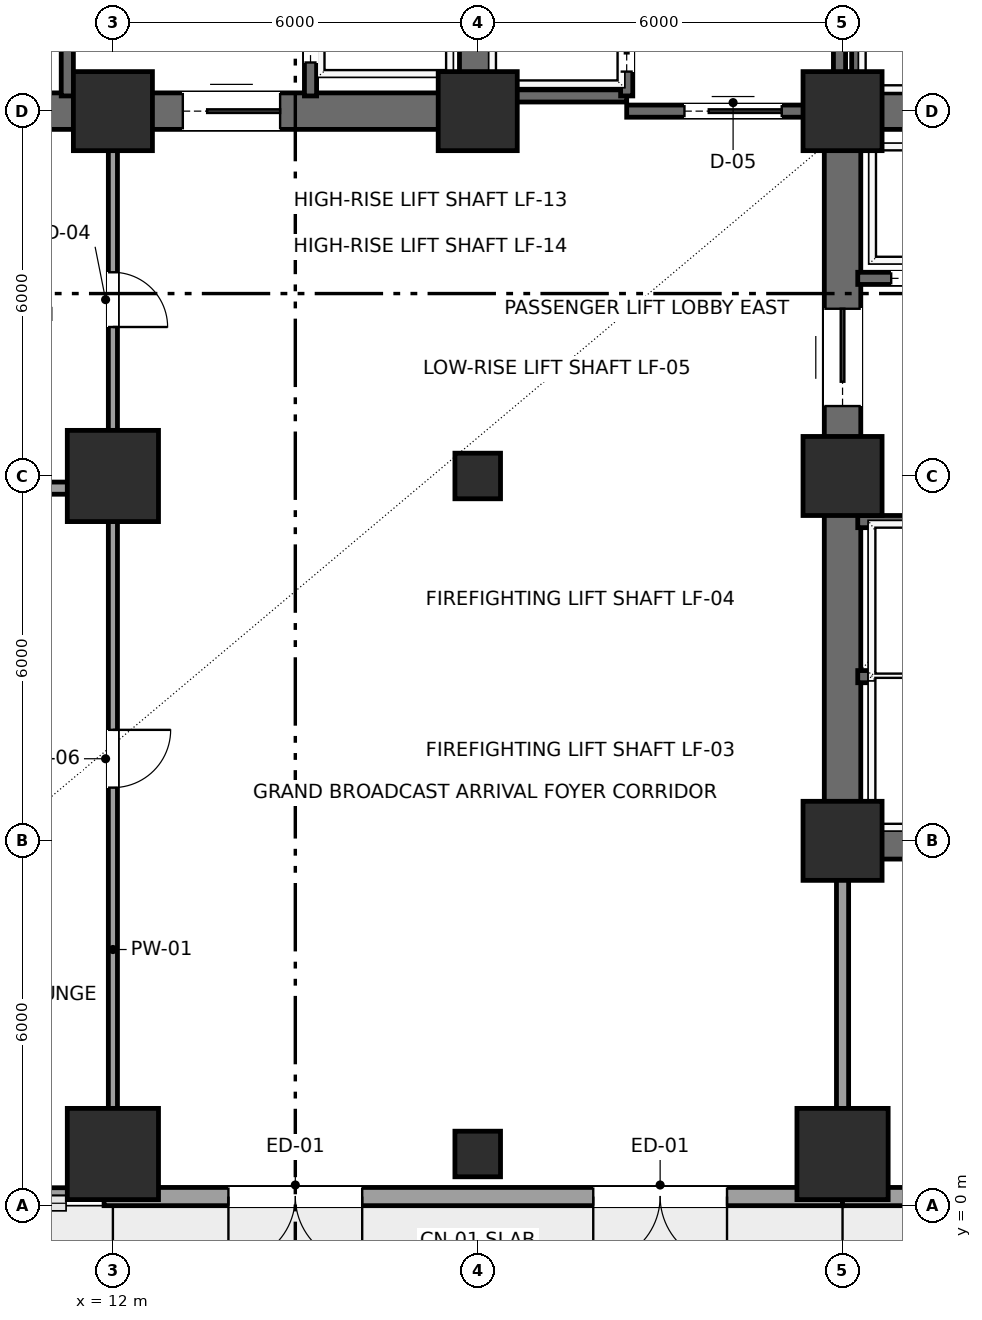
"""IFC4 building model, lengths in metres.
Left out: names, types, materials, properties, quantities, classifications, styles, units other than length and angle.
Written with IfcOpenShell. Run it as: python <this file> out.ifc"""

import sys

from ifc_helpers import new_model, si_unit, direction, frame, frame_2d, origin, origin_2d, place, context, subcontext, project, spatial, rectangle, hollow_rectangle, extrude, element, fill, save


model = new_model("IFC4")
c1 = context("Model", 3, precision=1e-05, world=origin(), true_north=direction((0.0, 1.0)))
c2 = subcontext(c1, "Body", "Model", "MODEL_VIEW")
j1 = project(units=[si_unit("LENGTHUNIT", "METRE"), si_unit("PLANEANGLEUNIT", "RADIAN")], contexts=[c1])
p1 = place(None, origin())
s1 = spatial("IfcSite", under=j1, at=p1, CompositionType="ELEMENT")
p2 = place(p1, origin())
s2 = spatial("IfcBuilding", under=s1, at=p2, CompositionType="ELEMENT")
p3 = place(p2, origin())
s3 = spatial("IfcBuildingStorey", under=s2, at=p3, CompositionType="ELEMENT", Elevation=0.0)
for number, where, z_axis, x_axis in (
    (1, (12.0, 18.0, 0.0), (0.0, 0.0, 1.0), (1.0, 0.0, 0.0)),
    (2, (18.0, 18.0, 0.0), (0.0, 0.0, 1.0), (1.0, 0.0, 0.0)),
    (3, (24.0, 6.0, 0.0), (0.0, 0.0, 1.0), (1.0, 0.0, 0.0)),
    (4, (24.0, 12.0, 0.0), (0.0, 0.0, 1.0), (1.0, 0.0, 0.0)),
    (5, (24.0, 18.0, 0.0), (0.0, 0.0, 1.0), (1.0, 0.0, 0.0)),
):
    element("IfcColumn", number, at=place(p3, frame(where, z_axis=z_axis, x_axis=x_axis)), inside=s3, PredefinedType="COLUMN", context=c2, shape_type="SweptSolid", body=[
        extrude(rectangle(XDim=1.3, YDim=1.3, at=origin_2d()), origin(), (0.0, 0.0, 1.0), 5.7),
    ])
for number, where, z_axis, x_axis in (
    (6, (12.0, 0.85, 0.0), (0.0, 0.0, 1.0), (1.0, 0.0, 0.0)),
    (7, (12.0, 12.0, 0.0), (0.0, 0.0, 1.0), (1.0, 0.0, 0.0)),
):
    element("IfcColumn", number, at=place(p3, frame(where, z_axis=z_axis, x_axis=x_axis)), inside=s3, PredefinedType="COLUMN", context=c2, shape_type="SweptSolid", body=[
        extrude(rectangle(XDim=1.5, YDim=1.5, at=origin_2d()), origin(), (0.0, 0.0, 1.0), 5.7),
    ])
for number, where, z_axis, x_axis in (
    (8, (18.0, 0.85, 0.0), (0.0, 0.0, 1.0), (1.0, 0.0, 0.0)),
    (9, (18.0, 12.0, 0.0), (0.0, 0.0, 1.0), (1.0, 0.0, 0.0)),
):
    element("IfcColumn", number, at=place(p3, frame(where, z_axis=z_axis, x_axis=x_axis)), inside=s3, PredefinedType="COLUMN", context=c2, shape_type="SweptSolid", body=[
        extrude(hollow_rectangle(XDim=0.75, YDim=0.75, WallThickness=0.035, InnerFilletRadius=0.035, OuterFilletRadius=0.05, at=origin_2d()), origin(), (0.0, 0.0, 1.0), 5.7),
    ])
p4 = place(p3, frame((24.0, 0.85, 0.0), z_axis=(0.0, 0.0, 1.0), x_axis=(1.0, 0.0, 0.0)))
e10 = element("IfcColumn", 10, at=p4, inside=s3, PredefinedType="COLUMN", context=c2, shape_type="SweptSolid", body=[
    extrude(rectangle(XDim=1.5, YDim=1.5, at=origin_2d()), origin(), (0.0, 0.0, 1.0), 5.7),
])
p5 = place(p3, frame((24.0, 0.15, 0.0), z_axis=(0.0, 0.0, 1.0), x_axis=(-1.0, 0.0, 0.0)))
e11 = element("IfcWall", 11, at=p5, inside=s3, PredefinedType="SOLIDWALL", context=c2, shape_type="SweptSolid", body=[
    extrude(rectangle(XDim=12.145, YDim=0.3, at=frame_2d((6.073, 0.0))), origin(), (0.0, 0.0, 1.0), 5.4),
])
p6 = place(p5, frame((1.9, 0.0, 0.0)))
e12 = element("IfcOpeningElement", 12, at=p6, cuts=e11, PredefinedType="OPENING", context=c2, shape_type="SweptSolid", body=[
    extrude(rectangle(XDim=2.2, YDim=2.6, at=frame_2d((1.1, 1.3))), frame((0.0, 0.16, 0.0), z_axis=(0.0, -1.0, 0.0), x_axis=(1.0, 0.0, 0.0)), (0.0, 0.0, 1.0), 0.32),
])
p7 = place(p5, frame((7.9, 0.0, 0.0)))
e13 = element("IfcOpeningElement", 13, at=p7, cuts=e11, PredefinedType="OPENING", context=c2, shape_type="SweptSolid", body=[
    extrude(rectangle(XDim=2.2, YDim=2.6, at=frame_2d((1.1, 1.3))), frame((0.0, 0.16, 0.0), z_axis=(0.0, -1.0, 0.0), x_axis=(1.0, 0.0, 0.0)), (0.0, 0.0, 1.0), 0.32),
])
p8 = place(p3, frame((53.295, 0.15, 0.0), z_axis=(0.0, 0.0, 1.0), x_axis=(-1.0, 0.0, 0.0)))
e14 = element("IfcWall", 14, at=p8, inside=s3, PredefinedType="SOLIDWALL", context=c2, shape_type="SweptSolid", body=[
    extrude(rectangle(XDim=29.295, YDim=0.3, at=frame_2d((14.647, 0.0))), origin(), (0.0, 0.0, 1.0), 5.4),
])
p9 = place(p8, frame((2.95, 0.0, 0.0)))
e15 = element("IfcOpeningElement", 15, at=p9, cuts=e14, PredefinedType="OPENING", context=c2, shape_type="SweptSolid", body=[
    extrude(rectangle(XDim=2.2, YDim=2.6, at=frame_2d((1.1, 1.3))), frame((0.0, 0.16, 0.0), z_axis=(0.0, -1.0, 0.0), x_axis=(1.0, 0.0, 0.0)), (0.0, 0.0, 1.0), 0.32),
])
p10 = place(p8, frame((9.0, 0.0, 0.0)))
e16 = element("IfcOpeningElement", 16, at=p10, cuts=e14, PredefinedType="OPENING", context=c2, shape_type="SweptSolid", body=[
    extrude(rectangle(XDim=2.2, YDim=2.6, at=frame_2d((1.1, 1.3))), frame((0.0, 0.16, 0.0), z_axis=(0.0, -1.0, 0.0), x_axis=(1.0, 0.0, 0.0)), (0.0, 0.0, 1.0), 0.32),
])
p11 = place(p8, frame((14.8, 0.0, 0.0)))
e17 = element("IfcOpeningElement", 17, at=p11, cuts=e14, PredefinedType="OPENING", context=c2, shape_type="SweptSolid", body=[
    extrude(rectangle(XDim=2.2, YDim=2.6, at=frame_2d((1.1, 1.3))), frame((0.0, 0.16, 0.0), z_axis=(0.0, -1.0, 0.0), x_axis=(1.0, 0.0, 0.0)), (0.0, 0.0, 1.0), 0.32),
])
p12 = place(p8, frame((25.6, 0.0, 0.0)))
e18 = element("IfcOpeningElement", 18, at=p12, cuts=e14, PredefinedType="OPENING", context=c2, shape_type="SweptSolid", body=[
    extrude(rectangle(XDim=1.1, YDim=2.2, at=frame_2d((0.55, 1.1))), frame((0.0, 0.16, 0.0), z_axis=(0.0, -1.0, 0.0), x_axis=(1.0, 0.0, 0.0)), (0.0, 0.0, 1.0), 0.32),
])
p13 = place(p3, frame((6.0, 18.0, 0.0), z_axis=(0.0, 0.0, 1.0), x_axis=(1.0, 0.0, 0.0)))
e19 = element("IfcWall", 19, at=p13, inside=s3, PredefinedType="SHEAR", context=c2, shape_type="SweptSolid", body=[
    extrude(rectangle(XDim=12.0, YDim=0.6, at=frame_2d((6.0, 0.0))), origin(), (0.0, 0.0, 1.0), 5.4),
])
p14 = place(p13, frame((7.15, 0.0, 0.0)))
e20 = element("IfcOpeningElement", 20, at=p14, cuts=e19, PredefinedType="OPENING", context=c2, shape_type="SweptSolid", body=[
    extrude(rectangle(XDim=1.6, YDim=2.3, at=frame_2d((0.8, 1.15))), frame((0.0, 0.31, 0.0), z_axis=(0.0, -1.0, 0.0), x_axis=(1.0, 0.0, 0.0)), (0.0, 0.0, 1.0), 0.62),
])
p15 = place(p3, frame((18.0, 18.0, 0.0), z_axis=(0.0, 0.0, 1.0), x_axis=(0.0, 1.0, 0.0)))
e21 = element("IfcWall", 21, at=p15, inside=s3, PredefinedType="SHEAR", context=c2, shape_type="SweptSolid", body=[
    extrude(rectangle(XDim=9.6, YDim=0.6, at=frame_2d((4.8, 0.0))), origin(), (0.0, 0.0, 1.0), 5.4),
])
p16 = place(p3, frame((24.0, 6.0, 0.0), z_axis=(0.0, 0.0, 1.0), x_axis=(1.0, 0.0, 0.0)))
e22 = element("IfcWall", 22, at=p16, inside=s3, PredefinedType="SHEAR", context=c2, shape_type="SweptSolid", body=[
    extrude(rectangle(XDim=9.6, YDim=0.6, at=frame_2d((4.8, 0.0))), origin(), (0.0, 0.0, 1.0), 5.4),
])
p17 = place(p16, frame((6.45, 0.0, 0.0)))
e23 = element("IfcOpeningElement", 23, at=p17, cuts=e22, PredefinedType="OPENING", context=c2, shape_type="SweptSolid", body=[
    extrude(rectangle(XDim=1.1, YDim=2.2, at=frame_2d((0.55, 1.1))), frame((0.0, 0.31, 0.0), z_axis=(0.0, -1.0, 0.0), x_axis=(1.0, 0.0, 0.0)), (0.0, 0.0, 1.0), 0.62),
])
p18 = place(p3, frame((24.0, 18.0, 0.0), z_axis=(0.0, 0.0, 1.0), x_axis=(1.0, 0.0, 0.0)))
e24 = element("IfcWall", 24, at=p18, inside=s3, PredefinedType="SHEAR", context=c2, shape_type="SweptSolid", body=[
    extrude(rectangle(XDim=9.6, YDim=0.6, at=frame_2d((4.8, 0.0))), origin(), (0.0, 0.0, 1.0), 5.4),
])
p19 = place(p3, frame((24.0, 6.0, 0.0), z_axis=(0.0, 0.0, 1.0), x_axis=(0.0, 1.0, 0.0)))
e25 = element("IfcWall", 25, at=p19, inside=s3, PredefinedType="SHEAR", context=c2, shape_type="SweptSolid", body=[
    extrude(rectangle(XDim=12.0, YDim=0.6, at=frame_2d((6.0, 0.0))), origin(), (0.0, 0.0, 1.0), 5.4),
])
p20 = place(p19, frame((7.15, 0.0, 0.0)))
e26 = element("IfcOpeningElement", 26, at=p20, cuts=e25, PredefinedType="OPENING", context=c2, shape_type="SweptSolid", body=[
    extrude(rectangle(XDim=1.6, YDim=2.3, at=frame_2d((0.8, 1.15))), frame((0.0, 0.31, 0.0), z_axis=(0.0, -1.0, 0.0), x_axis=(1.0, 0.0, 0.0)), (0.0, 0.0, 1.0), 0.62),
])
for number, where, z_axis, x_axis in (
    (27, (11.25, 18.25, 0.0), (0.0, 0.0, 1.0), (0.0, 1.0, 0.0)),
    (28, (24.25, 8.7, 0.0), (0.0, 0.0, 1.0), (1.0, 0.0, 0.0)),
    (29, (24.25, 11.25, 0.0), (0.0, 0.0, 1.0), (1.0, 0.0, 0.0)),
):
    element("IfcWall", number, at=place(p3, frame(where, z_axis=z_axis, x_axis=x_axis)), inside=s3, PredefinedType="SHEAR", context=c2, shape_type="SweptSolid", body=[
        extrude(rectangle(XDim=2.17, YDim=0.2, at=frame_2d((1.085, 0.0))), origin(), (0.0, 0.0, 1.0), 5.4),
    ])
p21 = place(p3, frame((15.25, 18.25, 0.0), z_axis=(0.0, 0.0, 1.0), x_axis=(0.0, 1.0, 0.0)))
e30 = element("IfcWall", 30, at=p21, inside=s3, PredefinedType="SHEAR", context=c2, shape_type="SweptSolid", body=[
    extrude(rectangle(XDim=5.2, YDim=0.2, at=frame_2d((2.6, 0.0))), origin(), (0.0, 0.0, 1.0), 5.4),
])
p22 = place(p21, frame((0.55, 0.0, 0.0)))
e31 = element("IfcOpeningElement", 31, at=p22, cuts=e30, PredefinedType="OPENING", context=c2, shape_type="SweptSolid", body=[
    extrude(rectangle(XDim=1.2, YDim=2.2, at=frame_2d((0.6, 1.1))), frame((0.0, 0.11, 0.0), z_axis=(0.0, -1.0, 0.0), x_axis=(1.0, 0.0, 0.0)), (0.0, 0.0, 1.0), 0.22),
])
p23 = place(p21, frame((3.15, 0.0, 0.0)))
e32 = element("IfcOpeningElement", 32, at=p23, cuts=e30, PredefinedType="OPENING", context=c2, shape_type="SweptSolid", body=[
    extrude(rectangle(XDim=1.2, YDim=2.2, at=frame_2d((0.6, 1.1))), frame((0.0, 0.11, 0.0), z_axis=(0.0, -1.0, 0.0), x_axis=(1.0, 0.0, 0.0)), (0.0, 0.0, 1.0), 0.22),
])
p24 = place(p3, frame((24.25, 15.25, 0.0), z_axis=(0.0, 0.0, 1.0), x_axis=(1.0, 0.0, 0.0)))
e33 = element("IfcWall", 33, at=p24, inside=s3, PredefinedType="SHEAR", context=c2, shape_type="SweptSolid", body=[
    extrude(rectangle(XDim=5.2, YDim=0.2, at=frame_2d((2.6, 0.0))), origin(), (0.0, 0.0, 1.0), 5.4),
])
p25 = place(p24, frame((0.55, 0.0, 0.0)))
e34 = element("IfcOpeningElement", 34, at=p25, cuts=e33, PredefinedType="OPENING", context=c2, shape_type="SweptSolid", body=[
    extrude(rectangle(XDim=1.2, YDim=2.2, at=frame_2d((0.6, 1.1))), frame((0.0, 0.11, 0.0), z_axis=(0.0, -1.0, 0.0), x_axis=(1.0, 0.0, 0.0)), (0.0, 0.0, 1.0), 0.22),
])
p26 = place(p24, frame((3.15, 0.0, 0.0)))
e35 = element("IfcOpeningElement", 35, at=p26, cuts=e33, PredefinedType="OPENING", context=c2, shape_type="SweptSolid", body=[
    extrude(rectangle(XDim=1.2, YDim=2.2, at=frame_2d((0.6, 1.1))), frame((0.0, 0.11, 0.0), z_axis=(0.0, -1.0, 0.0), x_axis=(1.0, 0.0, 0.0)), (0.0, 0.0, 1.0), 0.22),
])
p27 = place(p3, frame((18.1, 18.25, 0.0), z_axis=(0.0, 0.0, 1.0), x_axis=(1.0, 0.0, 0.0)))
e36 = element("IfcWall", 36, at=p27, inside=s3, PredefinedType="SHEAR", context=c2, shape_type="SweptSolid", body=[
    extrude(rectangle(XDim=2.35, YDim=0.2, at=frame_2d((1.175, 0.0))), origin(), (0.0, 0.0, 1.0), 5.4),
])
p28 = place(p3, frame((20.45, 18.25, 0.0), z_axis=(0.0, 0.0, 1.0), x_axis=(0.0, 1.0, 0.0)))
e37 = element("IfcWall", 37, at=p28, inside=s3, PredefinedType="SHEAR", context=c2, shape_type="SweptSolid", body=[
    extrude(rectangle(XDim=9.05, YDim=0.2, at=frame_2d((4.525, 0.0))), origin(), (0.0, 0.0, 1.0), 5.4),
])
p29 = place(p28, frame((0.4, 0.0, 0.0)))
e38 = element("IfcOpeningElement", 38, at=p29, cuts=e37, PredefinedType="OPENING", context=c2, shape_type="SweptSolid", body=[
    extrude(rectangle(XDim=1.2, YDim=2.2, at=frame_2d((0.6, 1.1))), frame((0.0, 0.11, 0.0), z_axis=(0.0, -1.0, 0.0), x_axis=(1.0, 0.0, 0.0)), (0.0, 0.0, 1.0), 0.22),
])
p30 = place(p28, frame((2.65, 0.0, 0.0)))
e39 = element("IfcOpeningElement", 39, at=p30, cuts=e37, PredefinedType="OPENING", context=c2, shape_type="SweptSolid", body=[
    extrude(rectangle(XDim=1.2, YDim=2.2, at=frame_2d((0.6, 1.1))), frame((0.0, 0.11, 0.0), z_axis=(0.0, -1.0, 0.0), x_axis=(1.0, 0.0, 0.0)), (0.0, 0.0, 1.0), 0.22),
])
p31 = place(p28, frame((4.9, 0.0, 0.0)))
e40 = element("IfcOpeningElement", 40, at=p31, cuts=e37, PredefinedType="OPENING", context=c2, shape_type="SweptSolid", body=[
    extrude(rectangle(XDim=1.2, YDim=2.2, at=frame_2d((0.6, 1.1))), frame((0.0, 0.11, 0.0), z_axis=(0.0, -1.0, 0.0), x_axis=(1.0, 0.0, 0.0)), (0.0, 0.0, 1.0), 0.22),
])
p32 = place(p28, frame((7.15, 0.0, 0.0)))
e41 = element("IfcOpeningElement", 41, at=p32, cuts=e37, PredefinedType="OPENING", context=c2, shape_type="SweptSolid", body=[
    extrude(rectangle(XDim=1.2, YDim=2.2, at=frame_2d((0.6, 1.1))), frame((0.0, 0.11, 0.0), z_axis=(0.0, -1.0, 0.0), x_axis=(1.0, 0.0, 0.0)), (0.0, 0.0, 1.0), 0.22),
])
p33 = place(p3, frame((20.45, 18.0, 0.0), z_axis=(0.0, 0.0, 1.0), x_axis=(1.0, 0.0, 0.0)))
e42 = element("IfcWall", 42, at=p33, inside=s3, PredefinedType="SHEAR", context=c2, shape_type="SweptSolid", body=[
    extrude(rectangle(XDim=3.5, YDim=0.2, at=frame_2d((1.75, 0.0))), origin(), (0.0, 0.0, 1.0), 5.4),
])
p34 = place(p33, frame((0.95, 0.0, 0.0)))
e43 = element("IfcOpeningElement", 43, at=p34, cuts=e42, PredefinedType="OPENING", context=c2, shape_type="SweptSolid", body=[
    extrude(rectangle(XDim=1.6, YDim=2.3, at=frame_2d((0.8, 1.15))), frame((0.0, 0.11, 0.0), z_axis=(0.0, -1.0, 0.0), x_axis=(1.0, 0.0, 0.0)), (0.0, 0.0, 1.0), 0.22),
])
p35 = place(p3, frame((23.95, 18.0, 0.0), z_axis=(0.0, 0.0, 1.0), x_axis=(0.0, 1.0, 0.0)))
e44 = element("IfcWall", 44, at=p35, inside=s3, PredefinedType="SHEAR", context=c2, shape_type="SweptSolid", body=[
    extrude(rectangle(XDim=9.3, YDim=0.2, at=frame_2d((4.65, 0.0))), origin(), (0.0, 0.0, 1.0), 5.4),
])
p36 = place(p3, frame((24.25, 18.1, 0.0), z_axis=(0.0, 0.0, 1.0), x_axis=(0.0, 1.0, 0.0)))
e45 = element("IfcWall", 45, at=p36, inside=s3, PredefinedType="SHEAR", context=c2, shape_type="SweptSolid", body=[
    extrude(rectangle(XDim=2.35, YDim=0.2, at=frame_2d((1.175, 0.0))), origin(), (0.0, 0.0, 1.0), 5.4),
])
p37 = place(p3, frame((24.0, 0.22, 0.0), z_axis=(0.0, 0.0, 1.0), x_axis=(0.0, 1.0, 0.0)))
e46 = element("IfcWall", 46, at=p37, inside=s3, PredefinedType="SOLIDWALL", context=c2, shape_type="SweptSolid", body=[
    extrude(rectangle(XDim=5.78, YDim=0.2, at=frame_2d((2.89, 0.0))), origin(), (0.0, 0.0, 1.0), 3.492),
])
p38 = place(p3, frame((12.0, 17.96, 0.0), z_axis=(0.0, 0.0, 1.0), x_axis=(0.0, -1.0, 0.0)))
e47 = element("IfcWall", 47, at=p38, inside=s3, PredefinedType="PARTITIONING", context=c2, shape_type="SweptSolid", body=[
    extrude(rectangle(XDim=17.74, YDim=0.15, at=frame_2d((8.87, 0.0))), origin(), (0.0, 0.0, 1.0), 3.492),
])
p39 = place(p38, frame((2.61, 0.0, 0.0)))
e48 = element("IfcOpeningElement", 48, at=p39, cuts=e47, PredefinedType="OPENING", context=c2, shape_type="SweptSolid", body=[
    extrude(rectangle(XDim=0.9, YDim=2.15, at=frame_2d((0.45, 1.075))), frame((0.0, 0.085, 0.0), z_axis=(0.0, -1.0, 0.0), x_axis=(1.0, 0.0, 0.0)), (0.0, 0.0, 1.0), 0.17),
])
p40 = place(p38, frame((10.135, 0.0, 0.0)))
e49 = element("IfcOpeningElement", 49, at=p40, cuts=e47, PredefinedType="OPENING", context=c2, shape_type="SweptSolid", body=[
    extrude(rectangle(XDim=0.95, YDim=2.15, at=frame_2d((0.475, 1.075))), frame((0.0, 0.085, 0.0), z_axis=(0.0, -1.0, 0.0), x_axis=(1.0, 0.0, 0.0)), (0.0, 0.0, 1.0), 0.17),
])
p41 = place(p3, frame((0.22, 11.8, 0.0), z_axis=(0.0, 0.0, 1.0), x_axis=(1.0, 0.0, 0.0)))
e50 = element("IfcWall", 50, at=p41, inside=s3, PredefinedType="SOLIDWALL", context=c2, shape_type="SweptSolid", body=[
    extrude(rectangle(XDim=11.78, YDim=0.2, at=frame_2d((5.89, 0.0))), origin(), (0.0, 0.0, 1.0), 4.742),
])
p42 = place(p3, frame((0.22, 0.22, 0.0), z_axis=(0.0, 0.0, 1.0), x_axis=(1.0, 0.0, 0.0)))
e51 = element("IfcWall", 51, at=p42, inside=s3, PredefinedType="PARTITIONING", context=c2, shape_type="SweptSolid", body=[
    extrude(rectangle(XDim=11.635, YDim=0.15, at=frame_2d((5.817, 0.0))), origin(), (0.0, 0.0, 1.0), 5.4),
])
p43 = place(p6, origin())
e52 = element("IfcDoor", 52, at=p43, inside=s3, OperationType="DOUBLE_DOOR_SINGLE_SWING", PredefinedType="DOOR", context=c2, shape_type="SweptSolid", body=[
    extrude(rectangle(XDim=2.2, YDim=2.6, at=frame_2d((1.1, 1.3))), frame((0.0, 0.025, 0.0), z_axis=(0.0, -1.0, 0.0), x_axis=(1.0, 0.0, 0.0)), (0.0, 0.0, 1.0), 0.05),
])
fill(e12, e52)
p44 = place(p7, origin())
e53 = element("IfcDoor", 53, at=p44, inside=s3, OperationType="DOUBLE_DOOR_SINGLE_SWING", PredefinedType="DOOR", context=c2, shape_type="SweptSolid", body=[
    extrude(rectangle(XDim=2.2, YDim=2.6, at=frame_2d((1.1, 1.3))), frame((0.0, 0.025, 0.0), z_axis=(0.0, -1.0, 0.0), x_axis=(1.0, 0.0, 0.0)), (0.0, 0.0, 1.0), 0.05),
])
fill(e13, e53)
p45 = place(p14, origin())
e54 = element("IfcDoor", 54, at=p45, inside=s3, OperationType="DOUBLE_DOOR_SLIDING", PredefinedType="DOOR", context=c2, shape_type="SweptSolid", body=[
    extrude(rectangle(XDim=1.6, YDim=2.3, at=frame_2d((0.8, 1.15))), frame((0.0, 0.025, 0.0), z_axis=(0.0, -1.0, 0.0), x_axis=(1.0, 0.0, 0.0)), (0.0, 0.0, 1.0), 0.05),
])
fill(e20, e54)
p46 = place(p20, origin())
e55 = element("IfcDoor", 55, at=p46, inside=s3, OperationType="DOUBLE_DOOR_SLIDING", PredefinedType="DOOR", context=c2, shape_type="SweptSolid", body=[
    extrude(rectangle(XDim=1.6, YDim=2.3, at=frame_2d((0.8, 1.15))), frame((0.0, 0.025, 0.0), z_axis=(0.0, -1.0, 0.0), x_axis=(1.0, 0.0, 0.0)), (0.0, 0.0, 1.0), 0.05),
])
fill(e26, e55)
p47 = place(p22, origin())
e56 = element("IfcDoor", 56, at=p47, inside=s3, OperationType="SLIDING_TO_RIGHT", PredefinedType="DOOR", context=c2, shape_type="SweptSolid", body=[
    extrude(rectangle(XDim=1.2, YDim=2.2, at=frame_2d((0.6, 1.1))), frame((0.0, 0.025, 0.0), z_axis=(0.0, -1.0, 0.0), x_axis=(1.0, 0.0, 0.0)), (0.0, 0.0, 1.0), 0.05),
])
fill(e31, e56)
p48 = place(p25, origin())
e57 = element("IfcDoor", 57, at=p48, inside=s3, OperationType="SLIDING_TO_RIGHT", PredefinedType="DOOR", context=c2, shape_type="SweptSolid", body=[
    extrude(rectangle(XDim=1.2, YDim=2.2, at=frame_2d((0.6, 1.1))), frame((0.0, 0.025, 0.0), z_axis=(0.0, -1.0, 0.0), x_axis=(1.0, 0.0, 0.0)), (0.0, 0.0, 1.0), 0.05),
])
fill(e34, e57)
p49 = place(p29, origin())
e58 = element("IfcDoor", 58, at=p49, inside=s3, OperationType="SLIDING_TO_RIGHT", PredefinedType="DOOR", context=c2, shape_type="SweptSolid", body=[
    extrude(rectangle(XDim=1.2, YDim=2.2, at=frame_2d((0.6, 1.1))), frame((0.0, 0.025, 0.0), z_axis=(0.0, -1.0, 0.0), x_axis=(1.0, 0.0, 0.0)), (0.0, 0.0, 1.0), 0.05),
])
fill(e38, e58)
p50 = place(p34, origin())
e59 = element("IfcDoor", 59, at=p50, inside=s3, OperationType="DOUBLE_DOOR_SLIDING", PredefinedType="DOOR", context=c2, shape_type="SweptSolid", body=[
    extrude(rectangle(XDim=1.6, YDim=2.3, at=frame_2d((0.8, 1.15))), frame((0.0, 0.025, 0.0), z_axis=(0.0, -1.0, 0.0), x_axis=(1.0, 0.0, 0.0)), (0.0, 0.0, 1.0), 0.05),
])
fill(e43, e59)
p51 = place(p39, origin())
e60 = element("IfcDoor", 60, at=p51, inside=s3, OperationType="SINGLE_SWING_RIGHT", PredefinedType="DOOR", context=c2, shape_type="SweptSolid", body=[
    extrude(rectangle(XDim=0.9, YDim=2.15, at=frame_2d((0.45, 1.075))), frame((0.0, 0.025, 0.0), z_axis=(0.0, -1.0, 0.0), x_axis=(1.0, 0.0, 0.0)), (0.0, 0.0, 1.0), 0.05),
])
fill(e48, e60)
p52 = place(p40, origin())
e61 = element("IfcDoor", 61, at=p52, inside=s3, OperationType="SINGLE_SWING_LEFT", PredefinedType="DOOR", context=c2, shape_type="SweptSolid", body=[
    extrude(rectangle(XDim=0.95, YDim=2.15, at=frame_2d((0.475, 1.075))), frame((0.0, 0.025, 0.0), z_axis=(0.0, -1.0, 0.0), x_axis=(1.0, 0.0, 0.0)), (0.0, 0.0, 1.0), 0.05),
])
fill(e49, e61)
save(model, sys.argv[1])
